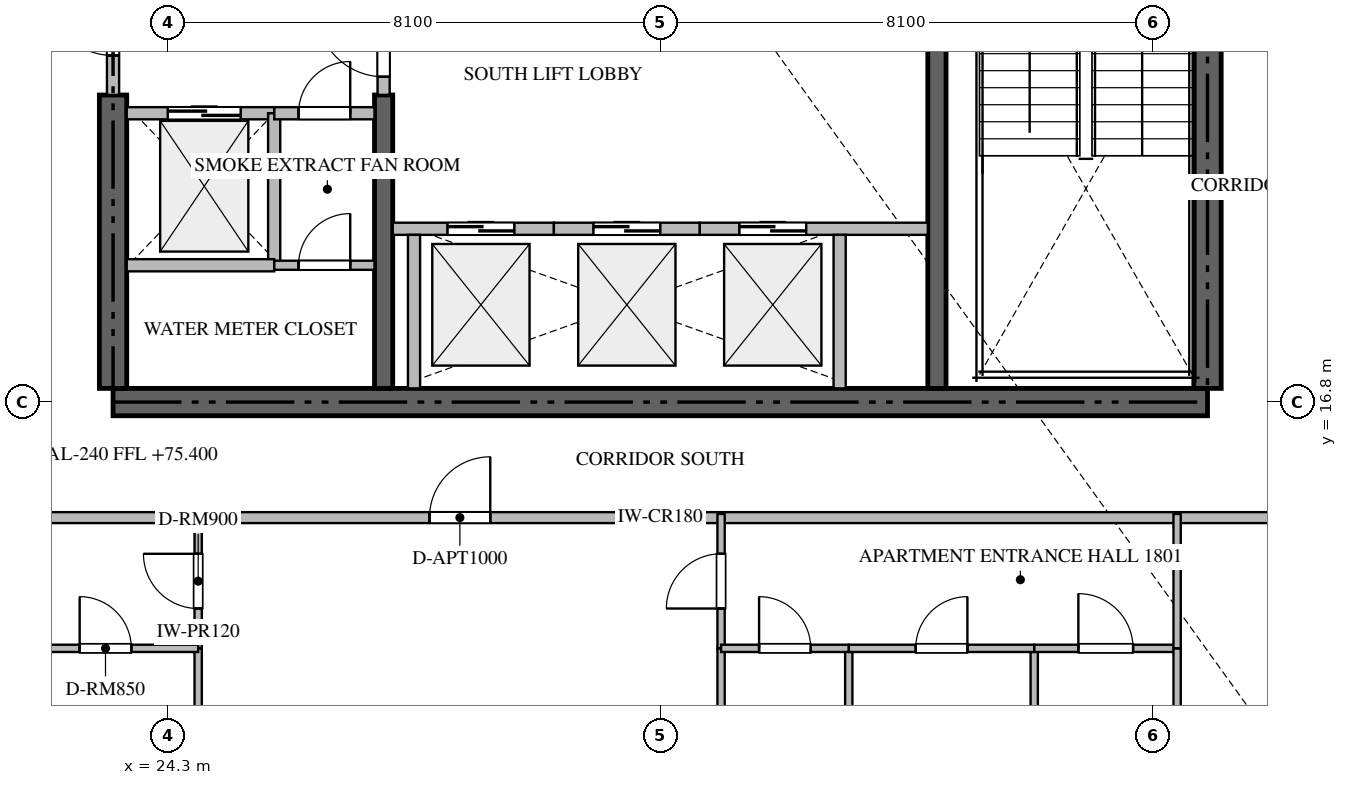
"""IFC4 building model, lengths in metres.
Left out: names, types, materials, properties, quantities, classifications, styles, units other than length and angle.
Written with IfcOpenShell. Run it as: python <this file> out.ifc"""

import sys

from ifc_helpers import new_model, si_unit, direction, frame, frame_2d, origin, place, context, subcontext, project, spatial, rectangle, extrude, source, transform, mapped, element, fill, save


model = new_model("IFC4")
c1 = context("Model", 3, precision=1e-05, world=origin(), true_north=direction((0.0, 1.0)))
c2 = subcontext(c1, "Body", "Model", "MODEL_VIEW")
j1 = project(units=[si_unit("LENGTHUNIT", "METRE"), si_unit("PLANEANGLEUNIT", "RADIAN")], contexts=[c1])
p1 = place(None, origin())
s1 = spatial("IfcSite", under=j1, at=p1, CompositionType="ELEMENT")
p2 = place(p1, origin())
s2 = spatial("IfcBuilding", under=s1, at=p2, CompositionType="ELEMENT")
p3 = place(p2, frame((0.0, 0.0, 75.45)))
s3 = spatial("IfcBuildingStorey", under=s2, at=p3, CompositionType="ELEMENT", Elevation=75.45)
p4 = place(p3, frame((23.4, 16.8, -0.26), z_axis=(0.0, 0.0, 1.0), x_axis=(1.0, 0.0, 0.0)))
e1 = element("IfcWall", 1, at=p4, inside=s3, PredefinedType="SHEAR", context=c2, shape_type="SweptSolid", body=[
    extrude(rectangle(XDim=18.0, YDim=0.45, at=frame_2d((9.0, 0.0))), origin(), (0.0, 0.0, 1.0), 3.748),
])
p5 = place(p3, frame((23.4, 17.025, -0.26), z_axis=(0.0, 0.0, 1.0), x_axis=(0.0, 1.0, 0.0)))
e2 = element("IfcWall", 2, at=p5, inside=s3, PredefinedType="SHEAR", context=c2, shape_type="SweptSolid", body=[
    extrude(rectangle(XDim=4.825, YDim=0.45, at=frame_2d((2.413, 0.0))), origin(), (0.0, 0.0, 1.0), 3.748),
])
p6 = place(p3, frame((41.4, 17.025, -0.26), z_axis=(0.0, 0.0, 1.0), x_axis=(0.0, 1.0, 0.0)))
e3 = element("IfcWall", 3, at=p6, inside=s3, PredefinedType="SHEAR", context=c2, shape_type="SweptSolid", body=[
    extrude(rectangle(XDim=8.325, YDim=0.45, at=frame_2d((4.163, 0.0))), origin(), (0.0, 0.0, 1.0), 3.748),
])
p7 = place(p3, frame((27.85, 17.025, -0.26), z_axis=(0.0, 0.0, 1.0), x_axis=(0.0, 1.0, 0.0)))
e4 = element("IfcWall", 4, at=p7, inside=s3, PredefinedType="SHEAR", context=c2, shape_type="SweptSolid", body=[
    extrude(rectangle(XDim=4.825, YDim=0.3, at=frame_2d((2.413, 0.0))), origin(), (0.0, 0.0, 1.0), 3.748),
])
p8 = place(p3, frame((36.95, 17.025, -0.26), z_axis=(0.0, 0.0, 1.0), x_axis=(0.0, 1.0, 0.0)))
e5 = element("IfcWall", 5, at=p8, inside=s3, PredefinedType="SHEAR", context=c2, shape_type="SweptSolid", body=[
    extrude(rectangle(XDim=8.325, YDim=0.3, at=frame_2d((4.163, 0.0))), origin(), (0.0, 0.0, 1.0), 3.748),
])
p9 = place(p3, frame((23.625, 21.55, 0.0), z_axis=(0.0, 0.0, 1.0), x_axis=(1.0, 0.0, 0.0)))
e6 = element("IfcWall", 6, at=p9, inside=s3, PredefinedType="STANDARD", context=c2, shape_type="SweptSolid", body=[
    extrude(rectangle(XDim=2.425, YDim=0.2, at=frame_2d((1.212, 0.0))), origin(), (0.0, 0.0, 1.0), 3.49),
])
p10 = place(p9, frame((0.675, 0.0, 0.0)))
e7 = element("IfcOpeningElement", 7, at=p10, cuts=e6, PredefinedType="OPENING", context=c2, shape_type="SweptSolid", body=[
    extrude(rectangle(XDim=1.2, YDim=2.2, at=frame_2d((0.6, 1.1))), frame((0.0, 0.11, 0.0), z_axis=(0.0, -1.0, 0.0), x_axis=(1.0, 0.0, 0.0)), (0.0, 0.0, 1.0), 0.22),
])
p11 = place(p3, frame((28.0, 19.65, 0.0), z_axis=(0.0, 0.0, 1.0), x_axis=(1.0, 0.0, 0.0)))
e8 = element("IfcWall", 8, at=p11, inside=s3, PredefinedType="STANDARD", context=c2, shape_type="SweptSolid", body=[
    extrude(rectangle(XDim=2.65, YDim=0.2, at=frame_2d((1.325, 0.0))), origin(), (0.0, 0.0, 1.0), 3.49),
])
p12 = place(p11, frame((0.9, 0.0, 0.0)))
e9 = element("IfcOpeningElement", 9, at=p12, cuts=e8, PredefinedType="OPENING", context=c2, shape_type="SweptSolid", body=[
    extrude(rectangle(XDim=1.1, YDim=2.2, at=frame_2d((0.55, 1.1))), frame((0.0, 0.11, 0.0), z_axis=(0.0, -1.0, 0.0), x_axis=(1.0, 0.0, 0.0)), (0.0, 0.0, 1.0), 0.22),
])
p13 = place(p3, frame((28.35, 17.025, 0.0), z_axis=(0.0, 0.0, 1.0), x_axis=(0.0, 1.0, 0.0)))
e10 = element("IfcWall", 10, at=p13, inside=s3, PredefinedType="STANDARD", context=c2, shape_type="SweptSolid", body=[
    extrude(rectangle(XDim=2.525, YDim=0.2, at=frame_2d((1.263, 0.0))), origin(), (0.0, 0.0, 1.0), 3.49),
])
p14 = place(p3, frame((30.65, 19.65, 0.0), z_axis=(0.0, 0.0, 1.0), x_axis=(1.0, 0.0, 0.0)))
e11 = element("IfcWall", 11, at=p14, inside=s3, PredefinedType="STANDARD", context=c2, shape_type="SweptSolid", body=[
    extrude(rectangle(XDim=2.4, YDim=0.2, at=frame_2d((1.2, 0.0))), origin(), (0.0, 0.0, 1.0), 3.49),
])
p15 = place(p14, frame((0.65, 0.0, 0.0)))
e12 = element("IfcOpeningElement", 12, at=p15, cuts=e11, PredefinedType="OPENING", context=c2, shape_type="SweptSolid", body=[
    extrude(rectangle(XDim=1.1, YDim=2.2, at=frame_2d((0.55, 1.1))), frame((0.0, 0.11, 0.0), z_axis=(0.0, -1.0, 0.0), x_axis=(1.0, 0.0, 0.0)), (0.0, 0.0, 1.0), 0.22),
])
p16 = place(p3, frame((33.05, 19.65, 0.0), z_axis=(0.0, 0.0, 1.0), x_axis=(1.0, 0.0, 0.0)))
e13 = element("IfcWall", 13, at=p16, inside=s3, PredefinedType="STANDARD", context=c2, shape_type="SweptSolid", body=[
    extrude(rectangle(XDim=3.75, YDim=0.2, at=frame_2d((1.875, 0.0))), origin(), (0.0, 0.0, 1.0), 3.49),
])
p17 = place(p16, frame((0.65, 0.0, 0.0)))
e14 = element("IfcOpeningElement", 14, at=p17, cuts=e13, PredefinedType="OPENING", context=c2, shape_type="SweptSolid", body=[
    extrude(rectangle(XDim=1.1, YDim=2.2, at=frame_2d((0.55, 1.1))), frame((0.0, 0.11, 0.0), z_axis=(0.0, -1.0, 0.0), x_axis=(1.0, 0.0, 0.0)), (0.0, 0.0, 1.0), 0.22),
])
p18 = place(p3, frame((35.35, 17.025, 0.0), z_axis=(0.0, 0.0, 1.0), x_axis=(0.0, 1.0, 0.0)))
e15 = element("IfcWall", 15, at=p18, inside=s3, PredefinedType="STANDARD", context=c2, shape_type="SweptSolid", body=[
    extrude(rectangle(XDim=2.525, YDim=0.2, at=frame_2d((1.263, 0.0))), origin(), (0.0, 0.0, 1.0), 3.49),
])
p19 = place(p3, frame((26.05, 19.05, 0.0), z_axis=(0.0, 0.0, 1.0), x_axis=(0.0, 1.0, 0.0)))
e16 = element("IfcWall", 16, at=p19, inside=s3, PredefinedType="STANDARD", context=c2, shape_type="SweptSolid", body=[
    extrude(rectangle(XDim=2.5, YDim=0.2, at=frame_2d((1.25, 0.0))), origin(), (0.0, 0.0, 1.0), 3.49),
])
p20 = place(p3, frame((23.625, 19.05, 0.0), z_axis=(0.0, 0.0, 1.0), x_axis=(1.0, 0.0, 0.0)))
e17 = element("IfcWall", 17, at=p20, inside=s3, PredefinedType="STANDARD", context=c2, shape_type="SweptSolid", body=[
    extrude(rectangle(XDim=2.425, YDim=0.2, at=frame_2d((1.212, 0.0))), origin(), (0.0, 0.0, 1.0), 3.49),
])
p21 = place(p3, frame((26.052, 21.55, 0.0), z_axis=(0.0, 0.0, 1.0), x_axis=(1.0, 0.0, 0.0)))
e18 = element("IfcWall", 18, at=p21, inside=s3, PredefinedType="STANDARD", context=c2, shape_type="SweptSolid", body=[
    extrude(rectangle(XDim=1.648, YDim=0.2, at=frame_2d((0.824, 0.0))), origin(), (0.0, 0.0, 1.0), 3.49),
])
p22 = place(p21, frame((0.399, 0.0, 0.0)))
e19 = element("IfcOpeningElement", 19, at=p22, cuts=e18, PredefinedType="OPENING", context=c2, shape_type="SweptSolid", body=[
    extrude(rectangle(XDim=0.85, YDim=2.1, at=frame_2d((0.425, 1.05))), frame((0.0, 0.11, 0.0), z_axis=(0.0, -1.0, 0.0), x_axis=(1.0, 0.0, 0.0)), (0.0, 0.0, 1.0), 0.22),
])
p23 = place(p3, frame((23.4, 21.852, 0.0), z_axis=(0.0, 0.0, 1.0), x_axis=(0.0, 1.0, 0.0)))
e20 = element("IfcWall", 20, at=p23, inside=s3, PredefinedType="STANDARD", context=c2, shape_type="SweptSolid", body=[
    extrude(rectangle(XDim=2.396, YDim=0.2, at=frame_2d((1.198, 0.0))), origin(), (0.0, 0.0, 1.0), 3.49),
])
p24 = place(p23, frame((0.648, 0.0, 0.0)))
e21 = element("IfcOpeningElement", 21, at=p24, cuts=e20, PredefinedType="OPENING", context=c2, shape_type="SweptSolid", body=[
    extrude(rectangle(XDim=1.1, YDim=2.15, at=frame_2d((0.55, 1.075))), frame((0.0, 0.11, 0.0), z_axis=(0.0, -1.0, 0.0), x_axis=(1.0, 0.0, 0.0)), (0.0, 0.0, 1.0), 0.22),
])
p25 = place(p3, frame((27.85, 21.852, 0.0), z_axis=(0.0, 0.0, 1.0), x_axis=(0.0, 1.0, 0.0)))
e22 = element("IfcWall", 22, at=p25, inside=s3, PredefinedType="STANDARD", context=c2, shape_type="SweptSolid", body=[
    extrude(rectangle(XDim=1.696, YDim=0.2, at=frame_2d((0.848, 0.0))), origin(), (0.0, 0.0, 1.0), 3.49),
])
p26 = place(p25, frame((0.298, 0.0, 0.0)))
e23 = element("IfcOpeningElement", 23, at=p26, cuts=e22, PredefinedType="OPENING", context=c2, shape_type="SweptSolid", body=[
    extrude(rectangle(XDim=1.1, YDim=2.15, at=frame_2d((0.55, 1.075))), frame((0.0, 0.11, 0.0), z_axis=(0.0, -1.0, 0.0), x_axis=(1.0, 0.0, 0.0)), (0.0, 0.0, 1.0), 0.22),
])
p27 = place(p3, frame((26.052, 19.05, 0.0), z_axis=(0.0, 0.0, 1.0), x_axis=(1.0, 0.0, 0.0)))
e24 = element("IfcWall", 24, at=p27, inside=s3, PredefinedType="PARTITIONING", context=c2, shape_type="SweptSolid", body=[
    extrude(rectangle(XDim=1.648, YDim=0.15, at=frame_2d((0.824, 0.0))), origin(), (0.0, 0.0, 1.0), 3.49),
])
p28 = place(p27, frame((0.399, 0.0, 0.0)))
e25 = element("IfcOpeningElement", 25, at=p28, cuts=e24, PredefinedType="OPENING", context=c2, shape_type="SweptSolid", body=[
    extrude(rectangle(XDim=0.85, YDim=2.1, at=frame_2d((0.425, 1.05))), frame((0.0, 0.085, 0.0), z_axis=(0.0, -1.0, 0.0), x_axis=(1.0, 0.0, 0.0)), (0.0, 0.0, 1.0), 0.17),
])
p29 = place(p3, frame((21.402, 14.9, 0.0), z_axis=(0.0, 0.0, 1.0), x_axis=(1.0, 0.0, 0.0)))
e26 = element("IfcWall", 26, at=p29, inside=s3, PredefinedType="PARTITIONING", context=c2, shape_type="SweptSolid", body=[
    extrude(rectangle(XDim=21.996, YDim=0.18, at=frame_2d((10.998, 0.0))), origin(), (0.0, 0.0, 1.0), 3.49),
])
p30 = place(p29, frame((7.202, 0.0, 0.0)))
e27 = element("IfcOpeningElement", 27, at=p30, cuts=e26, PredefinedType="OPENING", context=c2, shape_type="SweptSolid", body=[
    extrude(rectangle(XDim=1.0, YDim=2.15, at=frame_2d((0.5, 1.075))), frame((0.0, 0.1, 0.0), z_axis=(0.0, -1.0, 0.0), x_axis=(1.0, 0.0, 0.0)), (0.0, 0.0, 1.0), 0.2),
])
p31 = place(p3, frame((24.8, 12.75, 0.0), z_axis=(0.0, 0.0, 1.0), x_axis=(0.0, 1.0, 0.0)))
e28 = element("IfcWall", 28, at=p31, inside=s3, PredefinedType="PARTITIONING", context=c2, shape_type="SweptSolid", body=[
    extrude(rectangle(XDim=2.21, YDim=0.12, at=frame_2d((1.105, 0.0))), origin(), (0.0, 0.0, 1.0), 3.49),
])
p32 = place(p31, frame((0.655, 0.0, 0.0)))
e29 = element("IfcOpeningElement", 29, at=p32, cuts=e28, PredefinedType="OPENING", context=c2, shape_type="SweptSolid", body=[
    extrude(rectangle(XDim=0.9, YDim=2.1, at=frame_2d((0.45, 1.05))), frame((0.0, 0.07, 0.0), z_axis=(0.0, -1.0, 0.0), x_axis=(1.0, 0.0, 0.0)), (0.0, 0.0, 1.0), 0.14),
])
p33 = place(p3, frame((24.8, 6.862, 0.0), z_axis=(0.0, 0.0, 1.0), x_axis=(0.0, 1.0, 0.0)))
e30 = element("IfcWall", 30, at=p33, inside=s3, PredefinedType="PARTITIONING", context=c2, shape_type="SweptSolid", body=[
    extrude(rectangle(XDim=5.886, YDim=0.12, at=frame_2d((2.943, 0.0))), origin(), (0.0, 0.0, 1.0), 3.49),
])
p34 = place(p3, frame((21.752, 12.75, 0.0), z_axis=(0.0, 0.0, 1.0), x_axis=(1.0, 0.0, 0.0)))
e31 = element("IfcWall", 31, at=p34, inside=s3, PredefinedType="PARTITIONING", context=c2, shape_type="SweptSolid", body=[
    extrude(rectangle(XDim=3.048, YDim=0.12, at=frame_2d((1.524, 0.0))), origin(), (0.0, 0.0, 1.0), 3.49),
])
p35 = place(p34, frame((1.099, 0.0, 0.0)))
e32 = element("IfcOpeningElement", 32, at=p35, cuts=e31, PredefinedType="OPENING", context=c2, shape_type="SweptSolid", body=[
    extrude(rectangle(XDim=0.85, YDim=2.1, at=frame_2d((0.425, 1.05))), frame((0.0, 0.07, 0.0), z_axis=(0.0, -1.0, 0.0), x_axis=(1.0, 0.0, 0.0)), (0.0, 0.0, 1.0), 0.14),
])
p36 = place(p3, frame((33.4, 12.75, 0.0), z_axis=(0.0, 0.0, 1.0), x_axis=(0.0, 1.0, 0.0)))
e33 = element("IfcWall", 33, at=p36, inside=s3, PredefinedType="PARTITIONING", context=c2, shape_type="SweptSolid", body=[
    extrude(rectangle(XDim=2.21, YDim=0.12, at=frame_2d((1.105, 0.0))), origin(), (0.0, 0.0, 1.0), 3.49),
])
p37 = place(p36, frame((0.655, 0.0, 0.0)))
e34 = element("IfcOpeningElement", 34, at=p37, cuts=e33, PredefinedType="OPENING", context=c2, shape_type="SweptSolid", body=[
    extrude(rectangle(XDim=0.9, YDim=2.1, at=frame_2d((0.45, 1.05))), frame((0.0, 0.07, 0.0), z_axis=(0.0, -1.0, 0.0), x_axis=(1.0, 0.0, 0.0)), (0.0, 0.0, 1.0), 0.14),
])
p38 = place(p3, frame((33.4, 6.862, 0.0), z_axis=(0.0, 0.0, 1.0), x_axis=(0.0, 1.0, 0.0)))
e35 = element("IfcWall", 35, at=p38, inside=s3, PredefinedType="PARTITIONING", context=c2, shape_type="SweptSolid", body=[
    extrude(rectangle(XDim=5.886, YDim=0.12, at=frame_2d((2.943, 0.0))), origin(), (0.0, 0.0, 1.0), 3.49),
])
p39 = place(p3, frame((38.55, 0.295, 0.0), z_axis=(0.0, 0.0, 1.0), x_axis=(0.0, 1.0, 0.0)))
e36 = element("IfcWall", 36, at=p39, inside=s3, PredefinedType="PARTITIONING", context=c2, shape_type="SweptSolid", body=[
    extrude(rectangle(XDim=12.455, YDim=0.12, at=frame_2d((6.228, 0.0))), origin(), (0.0, 0.0, 1.0), 3.49),
])
p40 = place(p3, frame((35.5, 6.86, 0.0), z_axis=(0.0, 0.0, 1.0), x_axis=(0.0, 1.0, 0.0)))
e37 = element("IfcWall", 37, at=p40, inside=s3, PredefinedType="PARTITIONING", context=c2, shape_type="SweptSolid", body=[
    extrude(rectangle(XDim=5.89, YDim=0.12, at=frame_2d((2.945, 0.0))), origin(), (0.0, 0.0, 1.0), 3.49),
])
p41 = place(p3, frame((33.4, 12.75, 0.0), z_axis=(0.0, 0.0, 1.0), x_axis=(1.0, 0.0, 0.0)))
e38 = element("IfcWall", 38, at=p41, inside=s3, PredefinedType="PARTITIONING", context=c2, shape_type="SweptSolid", body=[
    extrude(rectangle(XDim=2.1, YDim=0.12, at=frame_2d((1.05, 0.0))), origin(), (0.0, 0.0, 1.0), 3.49),
])
p42 = place(p41, frame((0.625, 0.0, 0.0)))
e39 = element("IfcOpeningElement", 39, at=p42, cuts=e38, PredefinedType="OPENING", context=c2, shape_type="SweptSolid", body=[
    extrude(rectangle(XDim=0.85, YDim=2.1, at=frame_2d((0.425, 1.05))), frame((0.0, 0.07, 0.0), z_axis=(0.0, -1.0, 0.0), x_axis=(1.0, 0.0, 0.0)), (0.0, 0.0, 1.0), 0.14),
])
p43 = place(p3, frame((35.502, 12.75, 0.0), z_axis=(0.0, 0.0, 1.0), x_axis=(1.0, 0.0, 0.0)))
e40 = element("IfcWall", 40, at=p43, inside=s3, PredefinedType="PARTITIONING", context=c2, shape_type="SweptSolid", body=[
    extrude(rectangle(XDim=3.048, YDim=0.12, at=frame_2d((1.524, 0.0))), origin(), (0.0, 0.0, 1.0), 3.49),
])
p44 = place(p43, frame((1.099, 0.0, 0.0)))
e41 = element("IfcOpeningElement", 41, at=p44, cuts=e40, PredefinedType="OPENING", context=c2, shape_type="SweptSolid", body=[
    extrude(rectangle(XDim=0.85, YDim=2.1, at=frame_2d((0.425, 1.05))), frame((0.0, 0.07, 0.0), z_axis=(0.0, -1.0, 0.0), x_axis=(1.0, 0.0, 0.0)), (0.0, 0.0, 1.0), 0.14),
])
p45 = place(p3, frame((38.552, 12.75, 0.0), z_axis=(0.0, 0.0, 1.0), x_axis=(1.0, 0.0, 0.0)))
e42 = element("IfcWall", 42, at=p45, inside=s3, PredefinedType="PARTITIONING", context=c2, shape_type="SweptSolid", body=[
    extrude(rectangle(XDim=2.348, YDim=0.12, at=frame_2d((1.174, 0.0))), origin(), (0.0, 0.0, 1.0), 3.49),
])
p46 = place(p45, frame((0.724, 0.0, 0.0)))
e43 = element("IfcOpeningElement", 43, at=p46, cuts=e42, PredefinedType="OPENING", context=c2, shape_type="SweptSolid", body=[
    extrude(rectangle(XDim=0.9, YDim=2.1, at=frame_2d((0.45, 1.05))), frame((0.0, 0.07, 0.0), z_axis=(0.0, -1.0, 0.0), x_axis=(1.0, 0.0, 0.0)), (0.0, 0.0, 1.0), 0.14),
])
p47 = place(p3, frame((40.9, 9.095, 0.0), z_axis=(0.0, 0.0, 1.0), x_axis=(0.0, 1.0, 0.0)))
e44 = element("IfcWall", 44, at=p47, inside=s3, PredefinedType="PARTITIONING", context=c2, shape_type="SweptSolid", body=[
    extrude(rectangle(XDim=3.655, YDim=0.12, at=frame_2d((1.828, 0.0))), origin(), (0.0, 0.0, 1.0), 3.49),
])
p48 = place(p47, frame((1.402, 0.0, 0.0)))
e45 = element("IfcOpeningElement", 45, at=p48, cuts=e44, PredefinedType="OPENING", context=c2, shape_type="SweptSolid", body=[
    extrude(rectangle(XDim=0.85, YDim=2.1, at=frame_2d((0.425, 1.05))), frame((0.0, 0.07, 0.0), z_axis=(0.0, -1.0, 0.0), x_axis=(1.0, 0.0, 0.0)), (0.0, 0.0, 1.0), 0.14),
])
p49 = place(p3, frame((40.9, 12.752, 0.0), z_axis=(0.0, 0.0, 1.0), x_axis=(0.0, 1.0, 0.0)))
e46 = element("IfcWall", 46, at=p49, inside=s3, PredefinedType="PARTITIONING", context=c2, shape_type="SweptSolid", body=[
    extrude(rectangle(XDim=2.208, YDim=0.12, at=frame_2d((1.104, 0.0))), origin(), (0.0, 0.0, 1.0), 3.49),
])
m1 = source(origin(), c2, "Body", "SweptSolid", [
    extrude(rectangle(XDim=1.2, YDim=2.2, at=frame_2d((0.6, 1.1))), frame((0.0, 0.025, 0.0), z_axis=(0.0, -1.0, 0.0), x_axis=(1.0, 0.0, 0.0)), (0.0, 0.0, 1.0), 0.05),
])
p50 = place(p10, origin())
e47 = element("IfcDoor", 47, at=p50, inside=s3, OperationType="DOUBLE_DOOR_SLIDING", PredefinedType="DOOR", context=c2, shape_type="MappedRepresentation", body=[
    mapped(m1, transform((0.0, 0.0, 0.0), scale=1.0)),
])
fill(e7, e47)
m2 = source(origin(), c2, "Body", "SweptSolid", [
    extrude(rectangle(XDim=1.1, YDim=2.2, at=frame_2d((0.55, 1.1))), frame((0.0, 0.025, 0.0), z_axis=(0.0, -1.0, 0.0), x_axis=(1.0, 0.0, 0.0)), (0.0, 0.0, 1.0), 0.05),
])
p51 = place(p12, origin())
e48 = element("IfcDoor", 48, at=p51, inside=s3, OperationType="DOUBLE_DOOR_SLIDING", PredefinedType="DOOR", context=c2, shape_type="MappedRepresentation", body=[
    mapped(m2, transform((0.0, 0.0, 0.0), scale=1.0)),
])
fill(e9, e48)
p52 = place(p15, origin())
e49 = element("IfcDoor", 49, at=p52, inside=s3, OperationType="DOUBLE_DOOR_SLIDING", PredefinedType="DOOR", context=c2, shape_type="MappedRepresentation", body=[
    mapped(m2, transform((0.0, 0.0, 0.0), scale=1.0)),
])
fill(e12, e49)
p53 = place(p17, origin())
e50 = element("IfcDoor", 50, at=p53, inside=s3, OperationType="DOUBLE_DOOR_SLIDING", PredefinedType="DOOR", context=c2, shape_type="MappedRepresentation", body=[
    mapped(m2, transform((0.0, 0.0, 0.0), scale=1.0)),
])
fill(e14, e50)
m3 = source(origin(), c2, "Body", "SweptSolid", [
    extrude(rectangle(XDim=0.85, YDim=2.1, at=frame_2d((0.425, 1.05))), frame((0.0, 0.025, 0.0), z_axis=(0.0, -1.0, 0.0), x_axis=(1.0, 0.0, 0.0)), (0.0, 0.0, 1.0), 0.05),
])
p54 = place(p22, origin())
e51 = element("IfcDoor", 51, at=p54, inside=s3, OperationType="SINGLE_SWING_RIGHT", PredefinedType="DOOR", context=c2, shape_type="MappedRepresentation", body=[
    mapped(m3, transform((0.0, 0.0, 0.0), scale=1.0)),
])
fill(e19, e51)
m4 = source(origin(), c2, "Body", "SweptSolid", [
    extrude(rectangle(XDim=1.1, YDim=2.15, at=frame_2d((0.55, 1.075))), frame((0.0, 0.025, 0.0), z_axis=(0.0, -1.0, 0.0), x_axis=(1.0, 0.0, 0.0)), (0.0, 0.0, 1.0), 0.05),
])
p55 = place(p24, origin())
e52 = element("IfcDoor", 52, at=p55, inside=s3, OperationType="SINGLE_SWING_RIGHT", PredefinedType="DOOR", context=c2, shape_type="MappedRepresentation", body=[
    mapped(m4, transform((0.0, 0.0, 0.0), scale=1.0)),
])
fill(e21, e52)
p56 = place(p26, origin())
e53 = element("IfcDoor", 53, at=p56, inside=s3, OperationType="SINGLE_SWING_RIGHT", PredefinedType="DOOR", context=c2, shape_type="MappedRepresentation", body=[
    mapped(m4, transform((0.0, 0.0, 0.0), scale=1.0)),
])
fill(e23, e53)
p57 = place(p28, origin())
e54 = element("IfcDoor", 54, at=p57, inside=s3, OperationType="SINGLE_SWING_RIGHT", PredefinedType="DOOR", context=c2, shape_type="MappedRepresentation", body=[
    mapped(m3, transform((0.0, 0.0, 0.0), scale=1.0)),
])
fill(e25, e54)
m5 = source(origin(), c2, "Body", "SweptSolid", [
    extrude(rectangle(XDim=1.0, YDim=2.15, at=frame_2d((0.5, 1.075))), frame((0.0, 0.025, 0.0), z_axis=(0.0, -1.0, 0.0), x_axis=(1.0, 0.0, 0.0)), (0.0, 0.0, 1.0), 0.05),
])
p58 = place(p30, origin())
e55 = element("IfcDoor", 55, at=p58, inside=s3, OperationType="SINGLE_SWING_RIGHT", PredefinedType="DOOR", context=c2, shape_type="MappedRepresentation", body=[
    mapped(m5, transform((0.0, 0.0, 0.0), scale=1.0)),
])
fill(e27, e55)
m6 = source(origin(), c2, "Body", "SweptSolid", [
    extrude(rectangle(XDim=0.9, YDim=2.1, at=frame_2d((0.45, 1.05))), frame((0.0, 0.025, 0.0), z_axis=(0.0, -1.0, 0.0), x_axis=(1.0, 0.0, 0.0)), (0.0, 0.0, 1.0), 0.05),
])
p59 = place(p32, origin())
e56 = element("IfcDoor", 56, at=p59, inside=s3, OperationType="SINGLE_SWING_RIGHT", PredefinedType="DOOR", context=c2, shape_type="MappedRepresentation", body=[
    mapped(m6, transform((0.0, 0.0, 0.0), scale=1.0)),
])
fill(e29, e56)
p60 = place(p35, origin())
e57 = element("IfcDoor", 57, at=p60, inside=s3, OperationType="SINGLE_SWING_LEFT", PredefinedType="DOOR", context=c2, shape_type="MappedRepresentation", body=[
    mapped(m3, transform((0.0, 0.0, 0.0), scale=1.0)),
])
fill(e32, e57)
p61 = place(p37, origin())
e58 = element("IfcDoor", 58, at=p61, inside=s3, OperationType="SINGLE_SWING_LEFT", PredefinedType="DOOR", context=c2, shape_type="MappedRepresentation", body=[
    mapped(m6, transform((0.0, 0.0, 0.0), scale=1.0)),
])
fill(e34, e58)
p62 = place(p42, origin())
e59 = element("IfcDoor", 59, at=p62, inside=s3, OperationType="SINGLE_SWING_LEFT", PredefinedType="DOOR", context=c2, shape_type="MappedRepresentation", body=[
    mapped(m3, transform((0.0, 0.0, 0.0), scale=1.0)),
])
fill(e39, e59)
p63 = place(p44, origin())
e60 = element("IfcDoor", 60, at=p63, inside=s3, OperationType="SINGLE_SWING_RIGHT", PredefinedType="DOOR", context=c2, shape_type="MappedRepresentation", body=[
    mapped(m3, transform((0.0, 0.0, 0.0), scale=1.0)),
])
fill(e41, e60)
p64 = place(p46, origin())
e61 = element("IfcDoor", 61, at=p64, inside=s3, OperationType="SINGLE_SWING_LEFT", PredefinedType="DOOR", context=c2, shape_type="MappedRepresentation", body=[
    mapped(m6, transform((0.0, 0.0, 0.0), scale=1.0)),
])
fill(e43, e61)
save(model, sys.argv[1])
